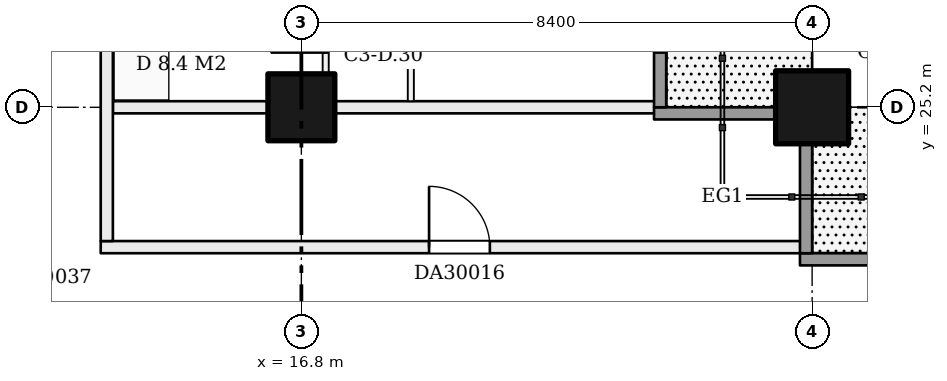
"""IFC4 building model, lengths in metres.
Left out: names, types, materials, properties, quantities, classifications, styles, units other than length and angle.
Written with IfcOpenShell. Run it as: python <this file> out.ifc"""

import sys

from ifc_helpers import new_model, si_unit, direction, frame, frame_2d, origin, origin_2d, place, context, subcontext, project, spatial, rectangle, extrude, element, fill, save


model = new_model("IFC4")
c1 = context("Model", 3, precision=1e-05, world=origin(), true_north=direction((0.0, 1.0)))
c2 = subcontext(c1, "Body", "Model", "MODEL_VIEW")
j1 = project(units=[si_unit("LENGTHUNIT", "METRE"), si_unit("PLANEANGLEUNIT", "RADIAN")], contexts=[c1])
p1 = place(None, origin())
s1 = spatial("IfcSite", under=j1, at=p1, CompositionType="ELEMENT")
p2 = place(p1, origin())
s2 = spatial("IfcBuilding", under=s1, at=p2, CompositionType="ELEMENT")
p3 = place(p2, frame((0.0, 0.0, 119.7)))
s3 = spatial("IfcBuildingStorey", under=s2, at=p3, CompositionType="ELEMENT", Elevation=119.7)
p4 = place(p3, frame((16.8, 25.2, 0.0), z_axis=(0.0, 0.0, 1.0), x_axis=(1.0, 0.0, 0.0)))
e1 = element("IfcColumn", 1, at=p4, inside=s3, PredefinedType="COLUMN", context=c2, shape_type="SweptSolid", body=[
    extrude(rectangle(XDim=1.1, YDim=1.1, at=origin_2d()), origin(), (0.0, 0.0, 1.0), 3.22),
])
p5 = place(p3, frame((25.2, 25.2, 0.0), z_axis=(0.0, 0.0, 1.0), x_axis=(1.0, 0.0, 0.0)))
e2 = element("IfcColumn", 2, at=p5, inside=s3, PredefinedType="COLUMN", context=c2, shape_type="SweptSolid", body=[
    extrude(rectangle(XDim=1.2, YDim=1.2, at=origin_2d()), origin(), (0.0, 0.0, 1.0), 3.22),
])
p6 = place(p3, frame((13.5, 22.9, 0.0), z_axis=(0.0, 0.0, 1.0), x_axis=(1.0, 0.0, 0.0)))
e3 = element("IfcWall", 3, at=p6, inside=s3, PredefinedType="PARTITIONING", context=c2, shape_type="SweptSolid", body=[
    extrude(rectangle(XDim=11.6, YDim=0.2, at=frame_2d((5.8, 0.0))), origin(), (0.0, 0.0, 1.0), 3.22),
])
p7 = place(p6, frame((5.4, 0.0, 0.0)))
e4 = element("IfcOpeningElement", 4, at=p7, cuts=e3, PredefinedType="OPENING", context=c2, shape_type="SweptSolid", body=[
    extrude(rectangle(XDim=1.0, YDim=2.1, at=frame_2d((0.5, 1.05))), frame((0.0, 0.11, 0.0), z_axis=(0.0, -1.0, 0.0), x_axis=(1.0, 0.0, 0.0)), (0.0, 0.0, 1.0), 0.22),
])
p8 = place(p3, frame((13.7, 25.2, 0.0), z_axis=(0.0, 0.0, 1.0), x_axis=(1.0, 0.0, 0.0)))
e5 = element("IfcWall", 5, at=p8, inside=s3, PredefinedType="PARTITIONING", context=c2, shape_type="SweptSolid", body=[
    extrude(rectangle(XDim=9.0, YDim=0.2, at=frame_2d((4.5, 0.0))), origin(), (0.0, 0.0, 1.0), 3.22),
])
p9 = place(p3, frame((13.6, 23.0, 0.0), z_axis=(0.0, 0.0, 1.0), x_axis=(0.0, 1.0, 0.0)))
e6 = element("IfcWall", 6, at=p9, inside=s3, PredefinedType="PARTITIONING", context=c2, shape_type="SweptSolid", body=[
    extrude(rectangle(XDim=19.0, YDim=0.2, at=frame_2d((9.5, 0.0))), origin(), (0.0, 0.0, 1.0), 3.22),
])
p10 = place(p9, frame((5.567, 0.0, 0.0)))
e7 = element("IfcOpeningElement", 7, at=p10, cuts=e6, PredefinedType="OPENING", context=c2, shape_type="SweptSolid", body=[
    extrude(rectangle(XDim=1.0, YDim=2.1, at=frame_2d((0.5, 1.05))), frame((0.0, 0.11, 0.0), z_axis=(0.0, -1.0, 0.0), x_axis=(1.0, 0.0, 0.0)), (0.0, 0.0, 1.0), 0.22),
])
p11 = place(p9, frame((13.967, 0.0, 0.0)))
e8 = element("IfcOpeningElement", 8, at=p11, cuts=e6, PredefinedType="OPENING", context=c2, shape_type="SweptSolid", body=[
    extrude(rectangle(XDim=1.0, YDim=2.1, at=frame_2d((0.5, 1.05))), frame((0.0, 0.11, 0.0), z_axis=(0.0, -1.0, 0.0), x_axis=(1.0, 0.0, 0.0)), (0.0, 0.0, 1.0), 0.22),
])
p12 = place(p3, frame((17.2, 25.3, 0.0), z_axis=(0.0, 0.0, 1.0), x_axis=(0.0, 1.0, 0.0)))
e9 = element("IfcWall", 9, at=p12, inside=s3, PredefinedType="PARTITIONING", context=c2, shape_type="SweptSolid", body=[
    extrude(rectangle(XDim=8.2, YDim=0.1, at=frame_2d((4.1, 0.0))), origin(), (0.0, 0.0, 1.0), 3.22),
])
p13 = place(p12, frame((3.367, 0.0, 0.0)))
e10 = element("IfcOpeningElement", 10, at=p13, cuts=e9, PredefinedType="OPENING", context=c2, shape_type="SweptSolid", body=[
    extrude(rectangle(XDim=0.9, YDim=2.1, at=frame_2d((0.45, 1.05))), frame((0.0, 0.06, 0.0), z_axis=(0.0, -1.0, 0.0), x_axis=(1.0, 0.0, 0.0)), (0.0, 0.0, 1.0), 0.12),
])
p14 = place(p12, frame((0.8, 0.0, 0.0)))
e11 = element("IfcOpeningElement", 11, at=p14, cuts=e9, PredefinedType="OPENING", context=c2, shape_type="SweptSolid", body=[
    extrude(rectangle(XDim=0.9, YDim=2.1, at=frame_2d((0.45, 1.05))), frame((0.0, 0.06, 0.0), z_axis=(0.0, -1.0, 0.0), x_axis=(1.0, 0.0, 0.0)), (0.0, 0.0, 1.0), 0.12),
])
p15 = place(p12, frame((6.233, 0.0, 0.0)))
e12 = element("IfcOpeningElement", 12, at=p15, cuts=e9, PredefinedType="OPENING", context=c2, shape_type="SweptSolid", body=[
    extrude(rectangle(XDim=0.9, YDim=2.1, at=frame_2d((0.45, 1.05))), frame((0.0, 0.06, 0.0), z_axis=(0.0, -1.0, 0.0), x_axis=(1.0, 0.0, 0.0)), (0.0, 0.0, 1.0), 0.12),
])
p16 = place(p3, frame((18.6, 25.3, 0.0), z_axis=(0.0, 0.0, 1.0), x_axis=(0.0, 1.0, 0.0)))
e13 = element("IfcWall", 13, at=p16, inside=s3, PredefinedType="PARTITIONING", context=c2, shape_type="SweptSolid", body=[
    extrude(rectangle(XDim=16.7, YDim=0.1, at=frame_2d((8.35, 0.0))), origin(), (0.0, 0.0, 1.0), 3.22),
])
p17 = place(p16, frame((1.5, 0.0, 0.0)))
e14 = element("IfcOpeningElement", 14, at=p17, cuts=e13, PredefinedType="OPENING", context=c2, shape_type="SweptSolid", body=[
    extrude(rectangle(XDim=0.9, YDim=2.1, at=frame_2d((0.45, 1.05))), frame((0.0, 0.06, 0.0), z_axis=(0.0, -1.0, 0.0), x_axis=(1.0, 0.0, 0.0)), (0.0, 0.0, 1.0), 0.12),
])
p18 = place(p16, frame((5.7, 0.0, 0.0)))
e15 = element("IfcOpeningElement", 15, at=p18, cuts=e13, PredefinedType="OPENING", context=c2, shape_type="SweptSolid", body=[
    extrude(rectangle(XDim=0.9, YDim=2.1, at=frame_2d((0.45, 1.05))), frame((0.0, 0.06, 0.0), z_axis=(0.0, -1.0, 0.0), x_axis=(1.0, 0.0, 0.0)), (0.0, 0.0, 1.0), 0.12),
])
p19 = place(p16, frame((9.9, 0.0, 0.0)))
e16 = element("IfcOpeningElement", 16, at=p19, cuts=e13, PredefinedType="OPENING", context=c2, shape_type="SweptSolid", body=[
    extrude(rectangle(XDim=0.9, YDim=2.1, at=frame_2d((0.45, 1.05))), frame((0.0, 0.06, 0.0), z_axis=(0.0, -1.0, 0.0), x_axis=(1.0, 0.0, 0.0)), (0.0, 0.0, 1.0), 0.12),
])
p20 = place(p16, frame((14.1, 0.0, 0.0)))
e17 = element("IfcOpeningElement", 17, at=p20, cuts=e13, PredefinedType="OPENING", context=c2, shape_type="SweptSolid", body=[
    extrude(rectangle(XDim=0.9, YDim=2.1, at=frame_2d((0.45, 1.05))), frame((0.0, 0.06, 0.0), z_axis=(0.0, -1.0, 0.0), x_axis=(1.0, 0.0, 0.0)), (0.0, 0.0, 1.0), 0.12),
])
p21 = place(p3, frame((42.0, 22.7, 0.0), z_axis=(0.0, 0.0, 1.0), x_axis=(-1.0, 0.0, 0.0)))
e18 = element("IfcWall", 18, at=p21, inside=s3, PredefinedType="SOLIDWALL", context=c2, shape_type="SweptSolid", body=[
    extrude(rectangle(XDim=17.0, YDim=0.2, at=frame_2d((8.5, 0.0))), origin(), (0.0, 0.0, 1.0), 3.22),
])
p22 = place(p21, frame((9.6, 0.0, 0.0)))
e19 = element("IfcOpeningElement", 19, at=p22, cuts=e18, PredefinedType="OPENING", context=c2, shape_type="SweptSolid", body=[
    extrude(rectangle(XDim=1.8, YDim=2.4, at=frame_2d((0.9, 1.2))), frame((0.0, 0.11, 0.0), z_axis=(0.0, -1.0, 0.0), x_axis=(1.0, 0.0, 0.0)), (0.0, 0.0, 1.0), 0.22),
])
p23 = place(p3, frame((25.1, 22.8, 0.0), z_axis=(0.0, 0.0, 1.0), x_axis=(0.0, 1.0, 0.0)))
e20 = element("IfcWall", 20, at=p23, inside=s3, PredefinedType="SOLIDWALL", context=c2, shape_type="SweptSolid", body=[
    extrude(rectangle(XDim=1.8, YDim=0.2, at=frame_2d((0.9, 0.0))), origin(), (0.0, 0.0, 1.0), 3.22),
])
p24 = place(p3, frame((24.6, 25.1, 0.0), z_axis=(0.0, 0.0, 1.0), x_axis=(-1.0, 0.0, 0.0)))
e21 = element("IfcWall", 21, at=p24, inside=s3, PredefinedType="SOLIDWALL", context=c2, shape_type="SweptSolid", body=[
    extrude(rectangle(XDim=2.0, YDim=0.2, at=frame_2d((1.0, 0.0))), origin(), (0.0, 0.0, 1.0), 3.22),
])
p25 = place(p3, frame((22.7, 25.2, 0.0), z_axis=(0.0, 0.0, 1.0), x_axis=(0.0, 1.0, 0.0)))
e22 = element("IfcWall", 22, at=p25, inside=s3, PredefinedType="SOLIDWALL", context=c2, shape_type="SweptSolid", body=[
    extrude(rectangle(XDim=16.8, YDim=0.2, at=frame_2d((8.4, 0.0))), origin(), (0.0, 0.0, 1.0), 3.22),
])
p26 = place(p25, frame((0.9, 0.0, 0.0)))
e23 = element("IfcOpeningElement", 23, at=p26, cuts=e22, PredefinedType="OPENING", context=c2, shape_type="SweptSolid", body=[
    extrude(rectangle(XDim=2.4, YDim=2.2, at=frame_2d((1.2, 1.1))), frame((0.0, 0.11, 0.0), z_axis=(0.0, -1.0, 0.0), x_axis=(1.0, 0.0, 0.0)), (0.0, 0.0, 1.0), 0.22),
])
p27 = place(p25, frame((5.1, 0.0, 0.9)))
e24 = element("IfcOpeningElement", 24, at=p27, cuts=e22, PredefinedType="OPENING", context=c2, shape_type="SweptSolid", body=[
    extrude(rectangle(XDim=2.4, YDim=1.5, at=frame_2d((1.2, 0.75))), frame((0.0, 0.11, 0.0), z_axis=(0.0, -1.0, 0.0), x_axis=(1.0, 0.0, 0.0)), (0.0, 0.0, 1.0), 0.22),
])
p28 = place(p25, frame((9.3, 0.0, 0.0)))
e25 = element("IfcOpeningElement", 25, at=p28, cuts=e22, PredefinedType="OPENING", context=c2, shape_type="SweptSolid", body=[
    extrude(rectangle(XDim=2.4, YDim=2.2, at=frame_2d((1.2, 1.1))), frame((0.0, 0.11, 0.0), z_axis=(0.0, -1.0, 0.0), x_axis=(1.0, 0.0, 0.0)), (0.0, 0.0, 1.0), 0.22),
])
p29 = place(p25, frame((13.5, 0.0, 0.9)))
e26 = element("IfcOpeningElement", 26, at=p29, cuts=e22, PredefinedType="OPENING", context=c2, shape_type="SweptSolid", body=[
    extrude(rectangle(XDim=2.4, YDim=1.5, at=frame_2d((1.2, 0.75))), frame((0.0, 0.11, 0.0), z_axis=(0.0, -1.0, 0.0), x_axis=(1.0, 0.0, 0.0)), (0.0, 0.0, 1.0), 0.22),
])
p30 = place(p7, origin())
e27 = element("IfcDoor", 27, at=p30, inside=s3, OperationType="SINGLE_SWING_LEFT", PredefinedType="DOOR", context=c2, shape_type="SweptSolid", body=[
    extrude(rectangle(XDim=1.0, YDim=2.1, at=frame_2d((0.5, 1.05))), frame((0.0, 0.025, 0.0), z_axis=(0.0, -1.0, 0.0), x_axis=(1.0, 0.0, 0.0)), (0.0, 0.0, 1.0), 0.05),
])
fill(e4, e27)
p31 = place(p26, origin())
e28 = element("IfcDoor", 28, at=p31, inside=s3, OperationType="DOUBLE_DOOR_SLIDING", PredefinedType="DOOR", context=c2, shape_type="SweptSolid", body=[
    extrude(rectangle(XDim=2.4, YDim=2.2, at=frame_2d((1.2, 1.1))), frame((0.0, 0.025, 0.0), z_axis=(0.0, -1.0, 0.0), x_axis=(1.0, 0.0, 0.0)), (0.0, 0.0, 1.0), 0.05),
])
fill(e23, e28)
save(model, sys.argv[1])
